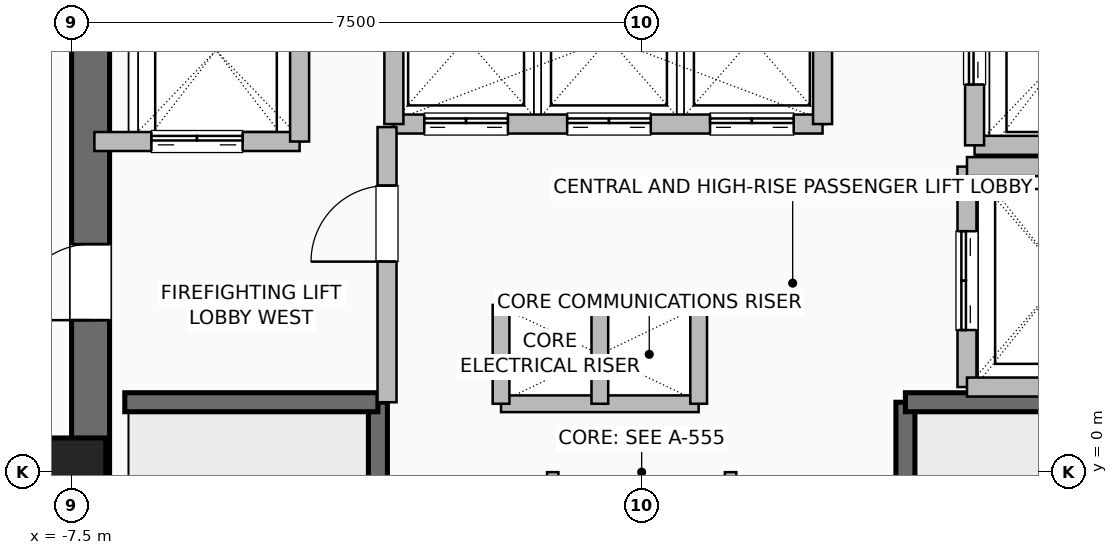
"""IFC4 building model, lengths in metres.
Left out: names, types, materials, properties, quantities, classifications, styles, units other than length and angle.
Written with IfcOpenShell. Run it as: python <this file> out.ifc"""

import sys

from ifc_helpers import new_model, si_unit, direction, frame, frame_2d, origin, origin_2d, place, context, subcontext, project, spatial, rectangle, hollow_rectangle, extrude, element, fill, save


model = new_model("IFC4")
c1 = context("Model", 3, precision=1e-05, world=origin(), true_north=direction((0.0, 1.0)))
c2 = subcontext(c1, "Body", "Model", "MODEL_VIEW")
j1 = project(units=[si_unit("LENGTHUNIT", "METRE"), si_unit("PLANEANGLEUNIT", "RADIAN")], contexts=[c1])
p1 = place(None, origin())
s1 = spatial("IfcSite", under=j1, at=p1, CompositionType="ELEMENT")
p2 = place(p1, origin())
s2 = spatial("IfcBuilding", under=s1, at=p2, CompositionType="ELEMENT")
p3 = place(p2, frame((0.0, 0.0, 220.2)))
s3 = spatial("IfcBuildingStorey", under=s2, at=p3, CompositionType="ELEMENT", Elevation=220.2)
p4 = place(p3, frame((-7.5, 0.0, 0.0), z_axis=(0.0, 0.0, 1.0), x_axis=(1.0, 0.0, 0.0)))
e1 = element("IfcColumn", 1, at=p4, inside=s3, PredefinedType="COLUMN", context=c2, shape_type="SweptSolid", body=[
    extrude(hollow_rectangle(XDim=0.9, YDim=0.9, WallThickness=0.045, at=origin_2d()), origin(), (0.0, 0.0, 1.0), 3.6),
])
p5 = place(p3, frame((-7.25, -7.5, 0.0), z_axis=(0.0, 0.0, 1.0), x_axis=(0.0, 1.0, 0.0)))
e2 = element("IfcWall", 2, at=p5, inside=s3, PredefinedType="SHEAR", context=c2, shape_type="SweptSolid", body=[
    extrude(rectangle(XDim=15.0, YDim=0.5, at=frame_2d((7.5, 0.0))), origin(), (0.0, 0.0, 1.0), 3.36),
])
p6 = place(p5, frame((9.5, 0.0, 0.0)))
e3 = element("IfcOpeningElement", 3, at=p6, cuts=e2, PredefinedType="OPENING", context=c2, shape_type="SweptSolid", body=[
    extrude(rectangle(XDim=1.0, YDim=2.08, at=frame_2d((0.5, 1.04))), frame((0.0, 0.26, 0.0), z_axis=(0.0, -1.0, 0.0), x_axis=(1.0, 0.0, 0.0)), (0.0, 0.0, 1.0), 0.52),
])
p7 = place(p3, frame((-3.47, -6.8, 0.0), z_axis=(0.0, 0.0, 1.0), x_axis=(0.0, 1.0, 0.0)))
e4 = element("IfcWall", 4, at=p7, inside=s3, PredefinedType="SHEAR", context=c2, shape_type="SweptSolid", body=[
    extrude(rectangle(XDim=7.72, YDim=0.25, at=frame_2d((3.86, 0.0))), origin(), (0.0, 0.0, 1.0), 3.36),
])
p8 = place(p3, frame((-6.8, 0.92, 0.0), z_axis=(0.0, 0.0, 1.0), x_axis=(1.0, 0.0, 0.0)))
e5 = element("IfcWall", 5, at=p8, inside=s3, PredefinedType="SHEAR", context=c2, shape_type="SweptSolid", body=[
    extrude(rectangle(XDim=3.33, YDim=0.25, at=frame_2d((1.665, 0.0))), origin(), (0.0, 0.0, 1.0), 3.36),
])
p9 = place(p3, frame((3.47, -6.8, 0.0), z_axis=(0.0, 0.0, 1.0), x_axis=(0.0, 1.0, 0.0)))
e6 = element("IfcWall", 6, at=p9, inside=s3, PredefinedType="SHEAR", context=c2, shape_type="SweptSolid", body=[
    extrude(rectangle(XDim=7.72, YDim=0.25, at=frame_2d((3.86, 0.0))), origin(), (0.0, 0.0, 1.0), 3.36),
])
p10 = place(p3, frame((3.47, 0.92, 0.0), z_axis=(0.0, 0.0, 1.0), x_axis=(1.0, 0.0, 0.0)))
e7 = element("IfcWall", 7, at=p10, inside=s3, PredefinedType="SHEAR", context=c2, shape_type="SweptSolid", body=[
    extrude(rectangle(XDim=3.33, YDim=0.25, at=frame_2d((1.665, 0.0))), origin(), (0.0, 0.0, 1.0), 3.36),
])
for number, where, z_axis, x_axis in (
    (8, (-1.85, 2.2, 0.0), (0.0, 0.0, 1.0), (1.0, 0.0, 0.0)),
    (9, (-1.85, 0.9, 0.0), (0.0, 0.0, 1.0), (1.0, 0.0, 0.0)),
):
    element("IfcWall", number, at=place(p3, frame(where, z_axis=z_axis, x_axis=x_axis)), inside=s3, PredefinedType="PARTITIONING", context=c2, shape_type="SweptSolid", body=[
        extrude(rectangle(XDim=2.6, YDim=0.22, at=frame_2d((1.3, 0.0))), origin(), (0.0, 0.0, 1.0), 3.36),
    ])
for number, where, z_axis, x_axis in (
    (10, (-0.55, 0.9, 0.0), (0.0, 0.0, 1.0), (0.0, 1.0, 0.0)),
    (11, (0.75, 0.9, 0.0), (0.0, 0.0, 1.0), (0.0, 1.0, 0.0)),
    (12, (-1.85, 0.9, 0.0), (0.0, 0.0, 1.0), (0.0, 1.0, 0.0)),
):
    element("IfcWall", number, at=place(p3, frame(where, z_axis=z_axis, x_axis=x_axis)), inside=s3, PredefinedType="PARTITIONING", context=c2, shape_type="SweptSolid", body=[
        extrude(rectangle(XDim=1.3, YDim=0.22, at=frame_2d((0.65, 0.0))), origin(), (0.0, 0.0, 1.0), 3.36),
    ])
p11 = place(p3, frame((-3.26, 4.58, 0.0), z_axis=(0.0, 0.0, 1.0), x_axis=(1.0, 0.0, 0.0)))
e13 = element("IfcWall", 13, at=p11, inside=s3, PredefinedType="SHEAR", context=c2, shape_type="SweptSolid", body=[
    extrude(rectangle(XDim=5.64, YDim=0.25, at=frame_2d((2.82, 0.0))), origin(), (0.0, 0.0, 1.0), 3.36),
])
p12 = place(p11, frame((0.4, 0.0, 0.0)))
e14 = element("IfcOpeningElement", 14, at=p12, cuts=e13, PredefinedType="OPENING", context=c2, shape_type="SweptSolid", body=[
    extrude(rectangle(XDim=1.1, YDim=2.2, at=frame_2d((0.55, 1.1))), frame((0.0, 0.135, 0.0), z_axis=(0.0, -1.0, 0.0), x_axis=(1.0, 0.0, 0.0)), (0.0, 0.0, 1.0), 0.27),
])
p13 = place(p11, frame((2.28, 0.0, 0.0)))
e15 = element("IfcOpeningElement", 15, at=p13, cuts=e13, PredefinedType="OPENING", context=c2, shape_type="SweptSolid", body=[
    extrude(rectangle(XDim=1.1, YDim=2.2, at=frame_2d((0.55, 1.1))), frame((0.0, 0.135, 0.0), z_axis=(0.0, -1.0, 0.0), x_axis=(1.0, 0.0, 0.0)), (0.0, 0.0, 1.0), 0.27),
])
p14 = place(p11, frame((4.16, 0.0, 0.0)))
e16 = element("IfcOpeningElement", 16, at=p14, cuts=e13, PredefinedType="OPENING", context=c2, shape_type="SweptSolid", body=[
    extrude(rectangle(XDim=1.1, YDim=2.2, at=frame_2d((0.55, 1.1))), frame((0.0, 0.135, 0.0), z_axis=(0.0, -1.0, 0.0), x_axis=(1.0, 0.0, 0.0)), (0.0, 0.0, 1.0), 0.27),
])
for number, where, z_axis, x_axis in (
    (17, (-3.26, 4.58, 0.0), (0.0, 0.0, 1.0), (0.0, 1.0, 0.0)),
    (18, (2.38, 4.58, 0.0), (0.0, 0.0, 1.0), (0.0, 1.0, 0.0)),
):
    element("IfcWall", number, at=place(p3, frame(where, z_axis=z_axis, x_axis=x_axis)), inside=s3, PredefinedType="SHEAR", context=c2, shape_type="SweptSolid", body=[
        extrude(rectangle(XDim=2.22, YDim=0.25, at=frame_2d((1.11, 0.0))), origin(), (0.0, 0.0, 1.0), 3.36),
    ])
p15 = place(p3, frame((-7.2, 4.35, 0.0), z_axis=(0.0, 0.0, 1.0), x_axis=(1.0, 0.0, 0.0)))
e19 = element("IfcWall", 19, at=p15, inside=s3, PredefinedType="SHEAR", context=c2, shape_type="SweptSolid", body=[
    extrude(rectangle(XDim=2.7, YDim=0.25, at=frame_2d((1.35, 0.0))), origin(), (0.0, 0.0, 1.0), 3.36),
])
p16 = place(p15, frame((0.75, 0.0, 0.0)))
e20 = element("IfcOpeningElement", 20, at=p16, cuts=e19, PredefinedType="OPENING", context=c2, shape_type="SweptSolid", body=[
    extrude(rectangle(XDim=1.2, YDim=2.2, at=frame_2d((0.6, 1.1))), frame((0.0, 0.135, 0.0), z_axis=(0.0, -1.0, 0.0), x_axis=(1.0, 0.0, 0.0)), (0.0, 0.0, 1.0), 0.27),
])
p17 = place(p3, frame((-4.5, 4.35, 0.0), z_axis=(0.0, 0.0, 1.0), x_axis=(0.0, 1.0, 0.0)))
e21 = element("IfcWall", 21, at=p17, inside=s3, PredefinedType="SHEAR", context=c2, shape_type="SweptSolid", body=[
    extrude(rectangle(XDim=2.85, YDim=0.25, at=frame_2d((1.425, 0.0))), origin(), (0.0, 0.0, 1.0), 3.36),
])
p18 = place(p3, frame((4.38, 4.3, 0.0), z_axis=(0.0, 0.0, 1.0), x_axis=(1.0, 0.0, 0.0)))
e22 = element("IfcWall", 22, at=p18, inside=s3, PredefinedType="SHEAR", context=c2, shape_type="SweptSolid", body=[
    extrude(rectangle(XDim=2.42, YDim=0.25, at=frame_2d((1.21, 0.0))), origin(), (0.0, 0.0, 1.0), 3.36),
])
p19 = place(p3, frame((4.38, 4.3, 0.0), z_axis=(0.0, 0.0, 1.0), x_axis=(0.0, 1.0, 0.0)))
e23 = element("IfcWall", 23, at=p19, inside=s3, PredefinedType="SHEAR", context=c2, shape_type="SweptSolid", body=[
    extrude(rectangle(XDim=2.5, YDim=0.25, at=frame_2d((1.25, 0.0))), origin(), (0.0, 0.0, 1.0), 3.36),
])
p20 = place(p19, frame((0.8, 0.0, 0.0)))
e24 = element("IfcOpeningElement", 24, at=p20, cuts=e23, PredefinedType="OPENING", context=c2, shape_type="SweptSolid", body=[
    extrude(rectangle(XDim=1.2, YDim=2.2, at=frame_2d((0.6, 1.1))), frame((0.0, 0.135, 0.0), z_axis=(0.0, -1.0, 0.0), x_axis=(1.0, 0.0, 0.0)), (0.0, 0.0, 1.0), 0.27),
])
p21 = place(p3, frame((4.28, 1.12, 0.0), z_axis=(0.0, 0.0, 1.0), x_axis=(0.0, 1.0, 0.0)))
e25 = element("IfcWall", 25, at=p21, inside=s3, PredefinedType="SHEAR", context=c2, shape_type="SweptSolid", body=[
    extrude(rectangle(XDim=2.9, YDim=0.25, at=frame_2d((1.45, 0.0))), origin(), (0.0, 0.0, 1.0), 3.36),
])
p22 = place(p21, frame((0.75, 0.0, 0.0)))
e26 = element("IfcOpeningElement", 26, at=p22, cuts=e25, PredefinedType="OPENING", context=c2, shape_type="SweptSolid", body=[
    extrude(rectangle(XDim=1.3, YDim=2.3, at=frame_2d((0.65, 1.15))), frame((0.0, 0.135, 0.0), z_axis=(0.0, -1.0, 0.0), x_axis=(1.0, 0.0, 0.0)), (0.0, 0.0, 1.0), 0.27),
])
for number, where, z_axis, x_axis in (
    (27, (4.28, 1.12, 0.0), (0.0, 0.0, 1.0), (1.0, 0.0, 0.0)),
    (28, (4.28, 4.02, 0.0), (0.0, 0.0, 1.0), (1.0, 0.0, 0.0)),
):
    element("IfcWall", number, at=place(p3, frame(where, z_axis=z_axis, x_axis=x_axis)), inside=s3, PredefinedType="SHEAR", context=c2, shape_type="SweptSolid", body=[
        extrude(rectangle(XDim=2.52, YDim=0.25, at=frame_2d((1.26, 0.0))), origin(), (0.0, 0.0, 1.0), 3.36),
    ])
p23 = place(p3, frame((-3.35, 0.92, 0.0), z_axis=(0.0, 0.0, 1.0), x_axis=(0.0, 1.0, 0.0)))
e29 = element("IfcWall", 29, at=p23, inside=s3, PredefinedType="SHEAR", context=c2, shape_type="SweptSolid", body=[
    extrude(rectangle(XDim=3.62, YDim=0.25, at=frame_2d((1.81, 0.0))), origin(), (0.0, 0.0, 1.0), 3.36),
])
p24 = place(p23, frame((1.85, 0.0, 0.0)))
e30 = element("IfcOpeningElement", 30, at=p24, cuts=e29, PredefinedType="OPENING", context=c2, shape_type="SweptSolid", body=[
    extrude(rectangle(XDim=1.0, YDim=2.08, at=frame_2d((0.5, 1.04))), frame((0.0, 0.135, 0.0), z_axis=(0.0, -1.0, 0.0), x_axis=(1.0, 0.0, 0.0)), (0.0, 0.0, 1.0), 0.27),
])
for number, where, z_axis, x_axis in (
    (31, (-1.17, -6.85, 0.0), (0.0, 0.0, 1.0), (0.0, 1.0, 0.0)),
    (32, (1.17, -6.85, 0.0), (0.0, 0.0, 1.0), (0.0, 1.0, 0.0)),
):
    element("IfcWall", number, at=place(p3, frame(where, z_axis=z_axis, x_axis=x_axis)), inside=s3, PredefinedType="PARTITIONING", context=c2, shape_type="SweptSolid", body=[
        extrude(rectangle(XDim=6.85, YDim=0.15, at=frame_2d((3.425, 0.0))), origin(), (0.0, 0.0, 1.0), 3.36),
    ])
p25 = place(p6, origin())
e33 = element("IfcDoor", 33, at=p25, inside=s3, OperationType="SINGLE_SWING_LEFT", PredefinedType="DOOR", context=c2, shape_type="SweptSolid", body=[
    extrude(rectangle(XDim=1.0, YDim=2.08, at=frame_2d((0.5, 1.04))), frame((0.0, 0.025, 0.0), z_axis=(0.0, -1.0, 0.0), x_axis=(1.0, 0.0, 0.0)), (0.0, 0.0, 1.0), 0.05),
])
fill(e3, e33)
p26 = place(p12, origin())
e34 = element("IfcDoor", 34, at=p26, inside=s3, OperationType="DOUBLE_DOOR_SLIDING", PredefinedType="DOOR", context=c2, shape_type="SweptSolid", body=[
    extrude(rectangle(XDim=1.1, YDim=2.2, at=frame_2d((0.55, 1.1))), frame((0.0, 0.025, 0.0), z_axis=(0.0, -1.0, 0.0), x_axis=(1.0, 0.0, 0.0)), (0.0, 0.0, 1.0), 0.05),
])
fill(e14, e34)
p27 = place(p13, origin())
e35 = element("IfcDoor", 35, at=p27, inside=s3, OperationType="DOUBLE_DOOR_SLIDING", PredefinedType="DOOR", context=c2, shape_type="SweptSolid", body=[
    extrude(rectangle(XDim=1.1, YDim=2.2, at=frame_2d((0.55, 1.1))), frame((0.0, 0.025, 0.0), z_axis=(0.0, -1.0, 0.0), x_axis=(1.0, 0.0, 0.0)), (0.0, 0.0, 1.0), 0.05),
])
fill(e15, e35)
p28 = place(p14, origin())
e36 = element("IfcDoor", 36, at=p28, inside=s3, OperationType="DOUBLE_DOOR_SLIDING", PredefinedType="DOOR", context=c2, shape_type="SweptSolid", body=[
    extrude(rectangle(XDim=1.1, YDim=2.2, at=frame_2d((0.55, 1.1))), frame((0.0, 0.025, 0.0), z_axis=(0.0, -1.0, 0.0), x_axis=(1.0, 0.0, 0.0)), (0.0, 0.0, 1.0), 0.05),
])
fill(e16, e36)
p29 = place(p16, origin())
e37 = element("IfcDoor", 37, at=p29, inside=s3, OperationType="DOUBLE_DOOR_SLIDING", PredefinedType="DOOR", context=c2, shape_type="SweptSolid", body=[
    extrude(rectangle(XDim=1.2, YDim=2.2, at=frame_2d((0.6, 1.1))), frame((0.0, 0.025, 0.0), z_axis=(0.0, -1.0, 0.0), x_axis=(1.0, 0.0, 0.0)), (0.0, 0.0, 1.0), 0.05),
])
fill(e20, e37)
p30 = place(p20, origin())
e38 = element("IfcDoor", 38, at=p30, inside=s3, OperationType="DOUBLE_DOOR_SLIDING", PredefinedType="DOOR", context=c2, shape_type="SweptSolid", body=[
    extrude(rectangle(XDim=1.2, YDim=2.2, at=frame_2d((0.6, 1.1))), frame((0.0, 0.025, 0.0), z_axis=(0.0, -1.0, 0.0), x_axis=(1.0, 0.0, 0.0)), (0.0, 0.0, 1.0), 0.05),
])
fill(e24, e38)
p31 = place(p22, origin())
e39 = element("IfcDoor", 39, at=p31, inside=s3, OperationType="DOUBLE_DOOR_SLIDING", PredefinedType="DOOR", context=c2, shape_type="SweptSolid", body=[
    extrude(rectangle(XDim=1.3, YDim=2.3, at=frame_2d((0.65, 1.15))), frame((0.0, 0.025, 0.0), z_axis=(0.0, -1.0, 0.0), x_axis=(1.0, 0.0, 0.0)), (0.0, 0.0, 1.0), 0.05),
])
fill(e26, e39)
p32 = place(p24, origin())
e40 = element("IfcDoor", 40, at=p32, inside=s3, OperationType="SINGLE_SWING_LEFT", PredefinedType="DOOR", context=c2, shape_type="SweptSolid", body=[
    extrude(rectangle(XDim=1.0, YDim=2.08, at=frame_2d((0.5, 1.04))), frame((0.0, 0.025, 0.0), z_axis=(0.0, -1.0, 0.0), x_axis=(1.0, 0.0, 0.0)), (0.0, 0.0, 1.0), 0.05),
])
fill(e30, e40)
save(model, sys.argv[1])
